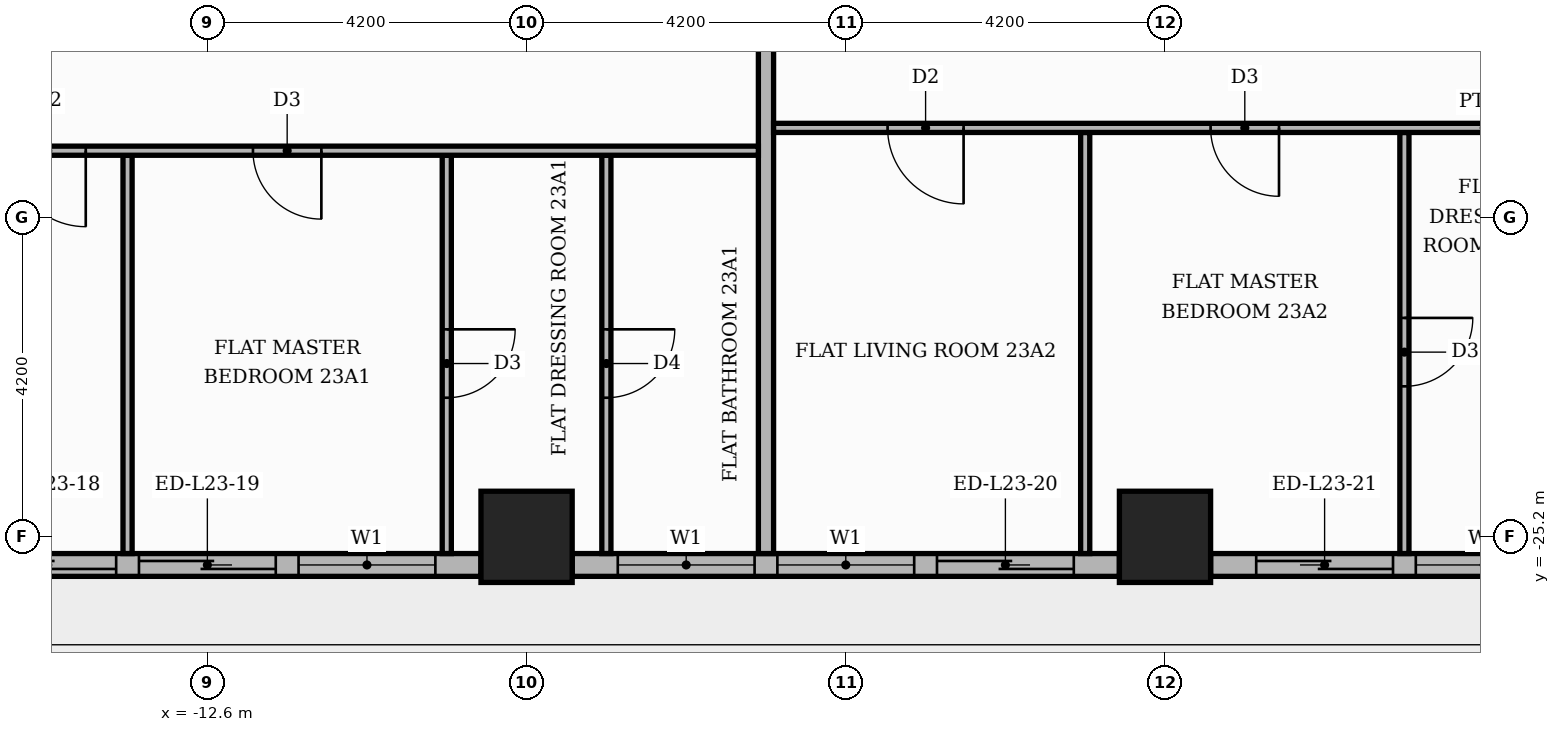
"""IFC4 building model, lengths in metres.
Left out: names, types, materials, properties, quantities, classifications, styles, units other than length and angle.
Written with IfcOpenShell. Run it as: python <this file> out.ifc"""

import sys

from ifc_helpers import new_model, si_unit, direction, frame, frame_2d, origin, origin_2d, place, context, subcontext, project, spatial, rectangle, extrude, element, fill, save


model = new_model("IFC4")
c1 = context("Model", 3, precision=1e-05, world=origin(), true_north=direction((0.0, 1.0)))
c2 = subcontext(c1, "Body", "Model", "MODEL_VIEW")
j1 = project(units=[si_unit("LENGTHUNIT", "METRE"), si_unit("PLANEANGLEUNIT", "RADIAN")], contexts=[c1])
p1 = place(None, origin())
s1 = spatial("IfcSite", under=j1, at=p1, CompositionType="ELEMENT")
p2 = place(p1, origin())
s2 = spatial("IfcBuilding", under=s1, at=p2, CompositionType="ELEMENT")
p3 = place(p2, frame((0.0, 0.0, 98.7)))
s3 = spatial("IfcBuildingStorey", under=s2, at=p3, CompositionType="ELEMENT", Elevation=98.7)
for number, where, z_axis, x_axis in (
    (1, (0.0, -25.2, 0.0), (0.0, 0.0, 1.0), (1.0, 0.0, 0.0)),
    (2, (-8.4, -25.2, 0.0), (0.0, 0.0, 1.0), (1.0, 0.0, 0.0)),
):
    element("IfcColumn", number, at=place(p3, frame(where, z_axis=z_axis, x_axis=x_axis)), inside=s3, PredefinedType="COLUMN", context=c2, shape_type="SweptSolid", body=[
        extrude(rectangle(XDim=1.2, YDim=1.2, at=origin_2d()), origin(), (0.0, 0.0, 1.0), 3.9),
    ])
p4 = place(p3, frame((-16.2, -25.57, 0.0), z_axis=(0.0, 0.0, 1.0), x_axis=(1.0, 0.0, 0.0)))
e3 = element("IfcWall", 3, at=p4, inside=s3, PredefinedType="STANDARD", context=c2, shape_type="SweptSolid", body=[
    extrude(rectangle(XDim=7.2, YDim=0.3, at=frame_2d((3.6, 0.0))), origin(), (0.0, 0.0, 1.0), 3.48),
])
p5 = place(p4, frame((0.6, 0.0, 0.0)))
e4 = element("IfcOpeningElement", 4, at=p5, cuts=e3, PredefinedType="OPENING", context=c2, shape_type="SweptSolid", body=[
    extrude(rectangle(XDim=1.8, YDim=2.4, at=frame_2d((0.9, 1.2))), frame((0.0, 0.16, 0.0), z_axis=(0.0, -1.0, 0.0), x_axis=(1.0, 0.0, 0.0)), (0.0, 0.0, 1.0), 0.32),
])
p6 = place(p4, frame((2.7, 0.0, 0.0)))
e5 = element("IfcOpeningElement", 5, at=p6, cuts=e3, PredefinedType="OPENING", context=c2, shape_type="SweptSolid", body=[
    extrude(rectangle(XDim=1.8, YDim=2.4, at=frame_2d((0.9, 1.2))), frame((0.0, 0.16, 0.0), z_axis=(0.0, -1.0, 0.0), x_axis=(1.0, 0.0, 0.0)), (0.0, 0.0, 1.0), 0.32),
])
p7 = place(p4, frame((4.8, 0.0, 0.9)))
e6 = element("IfcOpeningElement", 6, at=p7, cuts=e3, PredefinedType="OPENING", context=c2, shape_type="SweptSolid", body=[
    extrude(rectangle(XDim=1.8, YDim=2.1, at=frame_2d((0.9, 1.05))), frame((0.0, 0.16, 0.0), z_axis=(0.0, -1.0, 0.0), x_axis=(1.0, 0.0, 0.0)), (0.0, 0.0, 1.0), 0.32),
])
p8 = place(p3, frame((-7.8, -25.57, 0.0), z_axis=(0.0, 0.0, 1.0), x_axis=(1.0, 0.0, 0.0)))
e7 = element("IfcWall", 7, at=p8, inside=s3, PredefinedType="STANDARD", context=c2, shape_type="SweptSolid", body=[
    extrude(rectangle(XDim=7.2, YDim=0.3, at=frame_2d((3.6, 0.0))), origin(), (0.0, 0.0, 1.0), 3.48),
])
p9 = place(p8, frame((0.6, 0.0, 0.9)))
e8 = element("IfcOpeningElement", 8, at=p9, cuts=e7, PredefinedType="OPENING", context=c2, shape_type="SweptSolid", body=[
    extrude(rectangle(XDim=1.8, YDim=2.1, at=frame_2d((0.9, 1.05))), frame((0.0, 0.16, 0.0), z_axis=(0.0, -1.0, 0.0), x_axis=(1.0, 0.0, 0.0)), (0.0, 0.0, 1.0), 0.32),
])
p10 = place(p8, frame((2.7, 0.0, 0.9)))
e9 = element("IfcOpeningElement", 9, at=p10, cuts=e7, PredefinedType="OPENING", context=c2, shape_type="SweptSolid", body=[
    extrude(rectangle(XDim=1.8, YDim=2.1, at=frame_2d((0.9, 1.05))), frame((0.0, 0.16, 0.0), z_axis=(0.0, -1.0, 0.0), x_axis=(1.0, 0.0, 0.0)), (0.0, 0.0, 1.0), 0.32),
])
p11 = place(p8, frame((4.8, 0.0, 0.0)))
e10 = element("IfcOpeningElement", 10, at=p11, cuts=e7, PredefinedType="OPENING", context=c2, shape_type="SweptSolid", body=[
    extrude(rectangle(XDim=1.8, YDim=2.4, at=frame_2d((0.9, 1.2))), frame((0.0, 0.16, 0.0), z_axis=(0.0, -1.0, 0.0), x_axis=(1.0, 0.0, 0.0)), (0.0, 0.0, 1.0), 0.32),
])
p12 = place(p3, frame((0.6, -25.57, 0.0), z_axis=(0.0, 0.0, 1.0), x_axis=(1.0, 0.0, 0.0)))
e11 = element("IfcWall", 11, at=p12, inside=s3, PredefinedType="STANDARD", context=c2, shape_type="SweptSolid", body=[
    extrude(rectangle(XDim=7.2, YDim=0.3, at=frame_2d((3.6, 0.0))), origin(), (0.0, 0.0, 1.0), 3.48),
])
p13 = place(p12, frame((0.6, 0.0, 0.0)))
e12 = element("IfcOpeningElement", 12, at=p13, cuts=e11, PredefinedType="OPENING", context=c2, shape_type="SweptSolid", body=[
    extrude(rectangle(XDim=1.8, YDim=2.4, at=frame_2d((0.9, 1.2))), frame((0.0, 0.16, 0.0), z_axis=(0.0, -1.0, 0.0), x_axis=(1.0, 0.0, 0.0)), (0.0, 0.0, 1.0), 0.32),
])
p14 = place(p12, frame((2.7, 0.0, 0.9)))
e13 = element("IfcOpeningElement", 13, at=p14, cuts=e11, PredefinedType="OPENING", context=c2, shape_type="SweptSolid", body=[
    extrude(rectangle(XDim=1.8, YDim=2.1, at=frame_2d((0.9, 1.05))), frame((0.0, 0.16, 0.0), z_axis=(0.0, -1.0, 0.0), x_axis=(1.0, 0.0, 0.0)), (0.0, 0.0, 1.0), 0.32),
])
p15 = place(p12, frame((4.8, 0.0, 0.9)))
e14 = element("IfcOpeningElement", 14, at=p15, cuts=e11, PredefinedType="OPENING", context=c2, shape_type="SweptSolid", body=[
    extrude(rectangle(XDim=1.8, YDim=2.1, at=frame_2d((0.9, 1.05))), frame((0.0, 0.16, 0.0), z_axis=(0.0, -1.0, 0.0), x_axis=(1.0, 0.0, 0.0)), (0.0, 0.0, 1.0), 0.32),
])
p16 = place(p3, frame((-13.65, -25.42, 0.0), z_axis=(0.0, 0.0, 1.0), x_axis=(0.0, 1.0, 0.0)))
e15 = element("IfcWall", 15, at=p16, inside=s3, PredefinedType="PARTITIONING", context=c2, shape_type="SweptSolid", body=[
    extrude(rectangle(XDim=5.24, YDim=0.12, at=frame_2d((2.62, 0.0))), origin(), (0.0, 0.0, 1.0), 3.48),
])
p17 = place(p3, frame((-9.45, -25.42, 0.0), z_axis=(0.0, 0.0, 1.0), x_axis=(0.0, 1.0, 0.0)))
e16 = element("IfcWall", 16, at=p17, inside=s3, PredefinedType="PARTITIONING", context=c2, shape_type="SweptSolid", body=[
    extrude(rectangle(XDim=5.24, YDim=0.12, at=frame_2d((2.62, 0.0))), origin(), (0.0, 0.0, 1.0), 3.48),
])
p18 = place(p17, frame((2.05, 0.0, 0.0)))
e17 = element("IfcOpeningElement", 17, at=p18, cuts=e16, PredefinedType="OPENING", context=c2, shape_type="SweptSolid", body=[
    extrude(rectangle(XDim=0.9, YDim=2.1, at=frame_2d((0.45, 1.05))), frame((0.0, 0.07, 0.0), z_axis=(0.0, -1.0, 0.0), x_axis=(1.0, 0.0, 0.0)), (0.0, 0.0, 1.0), 0.14),
])
p19 = place(p3, frame((-7.35, -25.42, 0.0), z_axis=(0.0, 0.0, 1.0), x_axis=(0.0, 1.0, 0.0)))
e18 = element("IfcWall", 18, at=p19, inside=s3, PredefinedType="PARTITIONING", context=c2, shape_type="SweptSolid", body=[
    extrude(rectangle(XDim=5.24, YDim=0.12, at=frame_2d((2.62, 0.0))), origin(), (0.0, 0.0, 1.0), 3.48),
])
p20 = place(p19, frame((2.05, 0.0, 0.0)))
e19 = element("IfcOpeningElement", 19, at=p20, cuts=e18, PredefinedType="OPENING", context=c2, shape_type="SweptSolid", body=[
    extrude(rectangle(XDim=0.9, YDim=2.1, at=frame_2d((0.45, 1.05))), frame((0.0, 0.07, 0.0), z_axis=(0.0, -1.0, 0.0), x_axis=(1.0, 0.0, 0.0)), (0.0, 0.0, 1.0), 0.14),
])
p21 = place(p3, frame((-5.25, -25.42, 0.0), z_axis=(0.0, 0.0, 1.0), x_axis=(0.0, 1.0, 0.0)))
e20 = element("IfcWall", 20, at=p21, inside=s3, PredefinedType="PARTITIONING", context=c2, shape_type="SweptSolid", body=[
    extrude(rectangle(XDim=11.67, YDim=0.2, at=frame_2d((5.835, 0.0))), origin(), (0.0, 0.0, 1.0), 3.48),
])
p22 = place(p3, frame((-1.05, -25.42, 0.0), z_axis=(0.0, 0.0, 1.0), x_axis=(0.0, 1.0, 0.0)))
e21 = element("IfcWall", 21, at=p22, inside=s3, PredefinedType="PARTITIONING", context=c2, shape_type="SweptSolid", body=[
    extrude(rectangle(XDim=5.54, YDim=0.12, at=frame_2d((2.77, 0.0))), origin(), (0.0, 0.0, 1.0), 3.48),
])
p23 = place(p3, frame((3.15, -25.42, 0.0), z_axis=(0.0, 0.0, 1.0), x_axis=(0.0, 1.0, 0.0)))
e22 = element("IfcWall", 22, at=p23, inside=s3, PredefinedType="PARTITIONING", context=c2, shape_type="SweptSolid", body=[
    extrude(rectangle(XDim=5.54, YDim=0.12, at=frame_2d((2.77, 0.0))), origin(), (0.0, 0.0, 1.0), 3.48),
])
p24 = place(p23, frame((2.2, 0.0, 0.0)))
e23 = element("IfcOpeningElement", 23, at=p24, cuts=e22, PredefinedType="OPENING", context=c2, shape_type="SweptSolid", body=[
    extrude(rectangle(XDim=0.9, YDim=2.1, at=frame_2d((0.45, 1.05))), frame((0.0, 0.07, 0.0), z_axis=(0.0, -1.0, 0.0), x_axis=(1.0, 0.0, 0.0)), (0.0, 0.0, 1.0), 0.14),
])
p25 = place(p3, frame((-17.4, -20.12, 0.0), z_axis=(0.0, 0.0, 1.0), x_axis=(1.0, 0.0, 0.0)))
e24 = element("IfcWall", 24, at=p25, inside=s3, PredefinedType="PARTITIONING", context=c2, shape_type="SweptSolid", body=[
    extrude(rectangle(XDim=12.05, YDim=0.12, at=frame_2d((6.025, 0.0))), origin(), (0.0, 0.0, 1.0), 3.48),
])
p26 = place(p25, frame((2.2, 0.0, 0.0)))
e25 = element("IfcOpeningElement", 25, at=p26, cuts=e24, PredefinedType="OPENING", context=c2, shape_type="SweptSolid", body=[
    extrude(rectangle(XDim=1.0, YDim=2.1, at=frame_2d((0.5, 1.05))), frame((0.0, 0.07, 0.0), z_axis=(0.0, -1.0, 0.0), x_axis=(1.0, 0.0, 0.0)), (0.0, 0.0, 1.0), 0.14),
])
p27 = place(p25, frame((5.4, 0.0, 0.0)))
e26 = element("IfcOpeningElement", 26, at=p27, cuts=e24, PredefinedType="OPENING", context=c2, shape_type="SweptSolid", body=[
    extrude(rectangle(XDim=0.9, YDim=2.1, at=frame_2d((0.45, 1.05))), frame((0.0, 0.07, 0.0), z_axis=(0.0, -1.0, 0.0), x_axis=(1.0, 0.0, 0.0)), (0.0, 0.0, 1.0), 0.14),
])
p28 = place(p3, frame((-5.15, -19.82, 0.0), z_axis=(0.0, 0.0, 1.0), x_axis=(1.0, 0.0, 0.0)))
e27 = element("IfcWall", 27, at=p28, inside=s3, PredefinedType="PARTITIONING", context=c2, shape_type="SweptSolid", body=[
    extrude(rectangle(XDim=18.7, YDim=0.12, at=frame_2d((9.35, 0.0))), origin(), (0.0, 0.0, 1.0), 3.48),
])
p29 = place(p28, frame((1.5, 0.0, 0.0)))
e28 = element("IfcOpeningElement", 28, at=p29, cuts=e27, PredefinedType="OPENING", context=c2, shape_type="SweptSolid", body=[
    extrude(rectangle(XDim=1.0, YDim=2.1, at=frame_2d((0.5, 1.05))), frame((0.0, 0.07, 0.0), z_axis=(0.0, -1.0, 0.0), x_axis=(1.0, 0.0, 0.0)), (0.0, 0.0, 1.0), 0.14),
])
p30 = place(p28, frame((5.75, 0.0, 0.0)))
e29 = element("IfcOpeningElement", 29, at=p30, cuts=e27, PredefinedType="OPENING", context=c2, shape_type="SweptSolid", body=[
    extrude(rectangle(XDim=0.9, YDim=2.1, at=frame_2d((0.45, 1.05))), frame((0.0, 0.07, 0.0), z_axis=(0.0, -1.0, 0.0), x_axis=(1.0, 0.0, 0.0)), (0.0, 0.0, 1.0), 0.14),
])
p31 = place(p28, frame((14.15, 0.0, 0.0)))
e30 = element("IfcOpeningElement", 30, at=p31, cuts=e27, PredefinedType="OPENING", context=c2, shape_type="SweptSolid", body=[
    extrude(rectangle(XDim=0.9, YDim=2.1, at=frame_2d((0.45, 1.05))), frame((0.0, 0.07, 0.0), z_axis=(0.0, -1.0, 0.0), x_axis=(1.0, 0.0, 0.0)), (0.0, 0.0, 1.0), 0.14),
])
p32 = place(p5, origin())
e31 = element("IfcDoor", 31, at=p32, inside=s3, OperationType="SLIDING_TO_LEFT", PredefinedType="DOOR", context=c2, shape_type="SweptSolid", body=[
    extrude(rectangle(XDim=1.8, YDim=2.4, at=frame_2d((0.9, 1.2))), frame((0.0, 0.025, 0.0), z_axis=(0.0, -1.0, 0.0), x_axis=(1.0, 0.0, 0.0)), (0.0, 0.0, 1.0), 0.05),
])
fill(e4, e31)
p33 = place(p6, origin())
e32 = element("IfcDoor", 32, at=p33, inside=s3, OperationType="SLIDING_TO_RIGHT", PredefinedType="DOOR", context=c2, shape_type="SweptSolid", body=[
    extrude(rectangle(XDim=1.8, YDim=2.4, at=frame_2d((0.9, 1.2))), frame((0.0, 0.025, 0.0), z_axis=(0.0, -1.0, 0.0), x_axis=(1.0, 0.0, 0.0)), (0.0, 0.0, 1.0), 0.05),
])
fill(e5, e32)
p34 = place(p7, origin())
e33 = element("IfcWindow", 33, at=p34, inside=s3, PartitioningType="SINGLE_PANEL", PredefinedType="WINDOW", context=c2, shape_type="SweptSolid", body=[
    extrude(rectangle(XDim=1.8, YDim=2.1, at=frame_2d((0.9, 1.05))), frame((0.0, 0.03, 0.0), z_axis=(0.0, -1.0, 0.0), x_axis=(1.0, 0.0, 0.0)), (0.0, 0.0, 1.0), 0.06),
])
fill(e6, e33)
p35 = place(p9, origin())
e34 = element("IfcWindow", 34, at=p35, inside=s3, PartitioningType="SINGLE_PANEL", PredefinedType="WINDOW", context=c2, shape_type="SweptSolid", body=[
    extrude(rectangle(XDim=1.8, YDim=2.1, at=frame_2d((0.9, 1.05))), frame((0.0, 0.03, 0.0), z_axis=(0.0, -1.0, 0.0), x_axis=(1.0, 0.0, 0.0)), (0.0, 0.0, 1.0), 0.06),
])
fill(e8, e34)
p36 = place(p10, origin())
e35 = element("IfcWindow", 35, at=p36, inside=s3, PartitioningType="SINGLE_PANEL", PredefinedType="WINDOW", context=c2, shape_type="SweptSolid", body=[
    extrude(rectangle(XDim=1.8, YDim=2.1, at=frame_2d((0.9, 1.05))), frame((0.0, 0.03, 0.0), z_axis=(0.0, -1.0, 0.0), x_axis=(1.0, 0.0, 0.0)), (0.0, 0.0, 1.0), 0.06),
])
fill(e9, e35)
p37 = place(p11, origin())
e36 = element("IfcDoor", 36, at=p37, inside=s3, OperationType="SLIDING_TO_RIGHT", PredefinedType="DOOR", context=c2, shape_type="SweptSolid", body=[
    extrude(rectangle(XDim=1.8, YDim=2.4, at=frame_2d((0.9, 1.2))), frame((0.0, 0.025, 0.0), z_axis=(0.0, -1.0, 0.0), x_axis=(1.0, 0.0, 0.0)), (0.0, 0.0, 1.0), 0.05),
])
fill(e10, e36)
p38 = place(p13, origin())
e37 = element("IfcDoor", 37, at=p38, inside=s3, OperationType="SLIDING_TO_LEFT", PredefinedType="DOOR", context=c2, shape_type="SweptSolid", body=[
    extrude(rectangle(XDim=1.8, YDim=2.4, at=frame_2d((0.9, 1.2))), frame((0.0, 0.025, 0.0), z_axis=(0.0, -1.0, 0.0), x_axis=(1.0, 0.0, 0.0)), (0.0, 0.0, 1.0), 0.05),
])
fill(e12, e37)
p39 = place(p14, origin())
e38 = element("IfcWindow", 38, at=p39, inside=s3, PartitioningType="SINGLE_PANEL", PredefinedType="WINDOW", context=c2, shape_type="SweptSolid", body=[
    extrude(rectangle(XDim=1.8, YDim=2.1, at=frame_2d((0.9, 1.05))), frame((0.0, 0.03, 0.0), z_axis=(0.0, -1.0, 0.0), x_axis=(1.0, 0.0, 0.0)), (0.0, 0.0, 1.0), 0.06),
])
fill(e13, e38)
p40 = place(p26, frame((1.0, 0.0, 0.0), z_axis=(0.0, 0.0, 1.0), x_axis=(-1.0, 0.0, 0.0)))
e39 = element("IfcDoor", 39, at=p40, inside=s3, OperationType="SINGLE_SWING_RIGHT", PredefinedType="DOOR", context=c2, shape_type="SweptSolid", body=[
    extrude(rectangle(XDim=1.0, YDim=2.1, at=frame_2d((0.5, 1.05))), frame((0.0, 0.025, 0.0), z_axis=(0.0, -1.0, 0.0), x_axis=(1.0, 0.0, 0.0)), (0.0, 0.0, 1.0), 0.05),
])
fill(e25, e39)
p41 = place(p27, frame((0.9, 0.0, 0.0), z_axis=(0.0, 0.0, 1.0), x_axis=(-1.0, 0.0, 0.0)))
e40 = element("IfcDoor", 40, at=p41, inside=s3, OperationType="SINGLE_SWING_RIGHT", PredefinedType="DOOR", context=c2, shape_type="SweptSolid", body=[
    extrude(rectangle(XDim=0.9, YDim=2.1, at=frame_2d((0.45, 1.05))), frame((0.0, 0.025, 0.0), z_axis=(0.0, -1.0, 0.0), x_axis=(1.0, 0.0, 0.0)), (0.0, 0.0, 1.0), 0.05),
])
fill(e26, e40)
p42 = place(p18, frame((0.9, 0.0, 0.0), z_axis=(0.0, 0.0, 1.0), x_axis=(-1.0, 0.0, 0.0)))
e41 = element("IfcDoor", 41, at=p42, inside=s3, OperationType="SINGLE_SWING_RIGHT", PredefinedType="DOOR", context=c2, shape_type="SweptSolid", body=[
    extrude(rectangle(XDim=0.9, YDim=2.1, at=frame_2d((0.45, 1.05))), frame((0.0, 0.025, 0.0), z_axis=(0.0, -1.0, 0.0), x_axis=(1.0, 0.0, 0.0)), (0.0, 0.0, 1.0), 0.05),
])
fill(e17, e41)
p43 = place(p20, frame((0.9, 0.0, 0.0), z_axis=(0.0, 0.0, 1.0), x_axis=(-1.0, 0.0, 0.0)))
e42 = element("IfcDoor", 42, at=p43, inside=s3, OperationType="SINGLE_SWING_RIGHT", PredefinedType="DOOR", context=c2, shape_type="SweptSolid", body=[
    extrude(rectangle(XDim=0.9, YDim=2.1, at=frame_2d((0.45, 1.05))), frame((0.0, 0.025, 0.0), z_axis=(0.0, -1.0, 0.0), x_axis=(1.0, 0.0, 0.0)), (0.0, 0.0, 1.0), 0.05),
])
fill(e19, e42)
p44 = place(p29, frame((1.0, 0.0, 0.0), z_axis=(0.0, 0.0, 1.0), x_axis=(-1.0, 0.0, 0.0)))
e43 = element("IfcDoor", 43, at=p44, inside=s3, OperationType="SINGLE_SWING_RIGHT", PredefinedType="DOOR", context=c2, shape_type="SweptSolid", body=[
    extrude(rectangle(XDim=1.0, YDim=2.1, at=frame_2d((0.5, 1.05))), frame((0.0, 0.025, 0.0), z_axis=(0.0, -1.0, 0.0), x_axis=(1.0, 0.0, 0.0)), (0.0, 0.0, 1.0), 0.05),
])
fill(e28, e43)
p45 = place(p30, frame((0.9, 0.0, 0.0), z_axis=(0.0, 0.0, 1.0), x_axis=(-1.0, 0.0, 0.0)))
e44 = element("IfcDoor", 44, at=p45, inside=s3, OperationType="SINGLE_SWING_RIGHT", PredefinedType="DOOR", context=c2, shape_type="SweptSolid", body=[
    extrude(rectangle(XDim=0.9, YDim=2.1, at=frame_2d((0.45, 1.05))), frame((0.0, 0.025, 0.0), z_axis=(0.0, -1.0, 0.0), x_axis=(1.0, 0.0, 0.0)), (0.0, 0.0, 1.0), 0.05),
])
fill(e29, e44)
p46 = place(p24, frame((0.9, 0.0, 0.0), z_axis=(0.0, 0.0, 1.0), x_axis=(-1.0, 0.0, 0.0)))
e45 = element("IfcDoor", 45, at=p46, inside=s3, OperationType="SINGLE_SWING_RIGHT", PredefinedType="DOOR", context=c2, shape_type="SweptSolid", body=[
    extrude(rectangle(XDim=0.9, YDim=2.1, at=frame_2d((0.45, 1.05))), frame((0.0, 0.025, 0.0), z_axis=(0.0, -1.0, 0.0), x_axis=(1.0, 0.0, 0.0)), (0.0, 0.0, 1.0), 0.05),
])
fill(e23, e45)
save(model, sys.argv[1])
